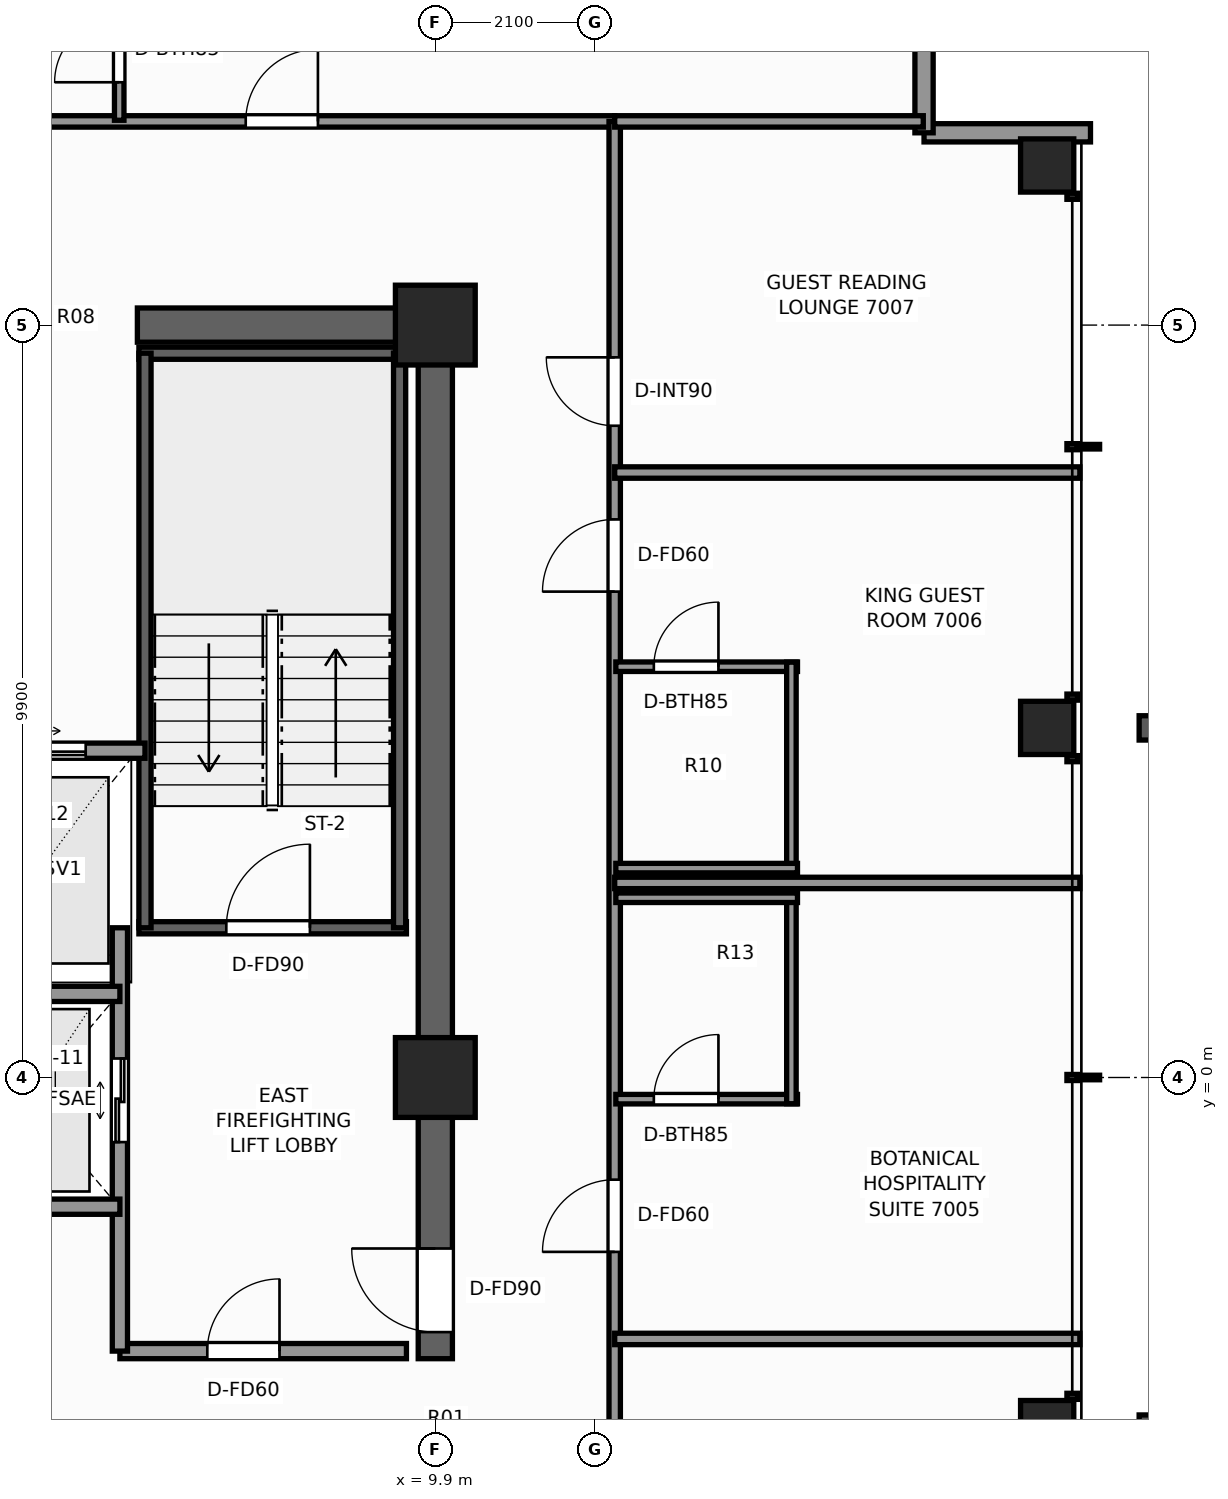
"""IFC4 building model, lengths in metres.
Left out: names, types, materials, properties, quantities, classifications, styles, units other than length and angle.
Written with IfcOpenShell. Run it as: python <this file> out.ifc"""

import sys

from ifc_helpers import new_model, si_unit, direction, frame, frame_2d, origin, origin_2d, place, context, subcontext, project, spatial, rectangle, extrude, element, fill, save


model = new_model("IFC4")
c1 = context("Model", 3, precision=1e-05, world=origin(), true_north=direction((0.0, 1.0)))
c2 = subcontext(c1, "Body", "Model", "MODEL_VIEW")
j1 = project(units=[si_unit("LENGTHUNIT", "METRE"), si_unit("PLANEANGLEUNIT", "RADIAN")], contexts=[c1])
p1 = place(None, origin())
s1 = spatial("IfcSite", under=j1, at=p1, CompositionType="ELEMENT")
p2 = place(p1, origin())
s2 = spatial("IfcBuilding", under=s1, at=p2, CompositionType="ELEMENT")
p3 = place(p2, frame((0.0, 0.0, 240.9)))
s3 = spatial("IfcBuildingStorey", under=s2, at=p3, CompositionType="ELEMENT", Elevation=240.9)
p4 = place(p3, frame((5.98, 9.9, 0.0), z_axis=(0.0, 0.0, 1.0), x_axis=(1.0, 0.0, 0.0)))
e1 = element("IfcWall", 1, at=p4, inside=s3, PredefinedType="SHEAR", context=c2, shape_type="SweptSolid", body=[
    extrude(rectangle(XDim=4.145, YDim=0.45, at=frame_2d((2.073, 0.0))), origin(), (0.0, 0.0, 1.0), 3.5),
])
p5 = place(p3, frame((9.9, -3.7, 0.0), z_axis=(0.0, 0.0, 1.0), x_axis=(0.0, 1.0, 0.0)))
e2 = element("IfcWall", 2, at=p5, inside=s3, PredefinedType="SHEAR", context=c2, shape_type="SweptSolid", body=[
    extrude(rectangle(XDim=13.375, YDim=0.45, at=frame_2d((6.688, 0.0))), origin(), (0.0, 0.0, 1.0), 3.5),
])
p6 = place(p5, frame((0.35, 0.0, 0.0)))
e3 = element("IfcOpeningElement", 3, at=p6, cuts=e2, PredefinedType="OPENING", context=c2, shape_type="SweptSolid", body=[
    extrude(rectangle(XDim=1.1, YDim=2.2, at=frame_2d((0.55, 1.1))), frame((0.0, 0.235, 0.0), z_axis=(0.0, -1.0, 0.0), x_axis=(1.0, 0.0, 0.0)), (0.0, 0.0, 1.0), 0.47),
])
for number, where, z_axis, x_axis in (
    (4, (9.9, 9.9, 0.0), (0.0, 0.0, 1.0), (1.0, 0.0, 0.0)),
    (5, (9.9, 0.0, 0.0), (0.0, 0.0, 1.0), (1.0, 0.0, 0.0)),
):
    element("IfcColumn", number, at=place(p3, frame(where, z_axis=z_axis, x_axis=x_axis)), inside=s3, PredefinedType="COLUMN", context=c2, shape_type="SweptSolid", body=[
        extrude(rectangle(XDim=1.05, YDim=1.05, at=origin_2d()), origin(), (0.0, 0.0, 1.0), 3.5),
    ])
for number, where, z_axis, x_axis in (
    (6, (17.95, -4.6, 0.0), (0.0, 0.0, 1.0), (1.0, 0.0, 0.0)),
    (7, (17.95, 4.6, 0.0), (0.0, 0.0, 1.0), (1.0, 0.0, 0.0)),
    (8, (17.95, 12.0, 0.0), (0.0, 0.0, 1.0), (1.0, 0.0, 0.0)),
):
    element("IfcColumn", number, at=place(p3, frame(where, z_axis=z_axis, x_axis=x_axis)), inside=s3, PredefinedType="COLUMN", context=c2, shape_type="SweptSolid", body=[
        extrude(rectangle(XDim=0.7, YDim=0.7, at=origin_2d()), origin(), (0.0, 0.0, 1.0), 3.5),
    ])
p7 = place(p3, frame((16.33, 12.43, 0.0), z_axis=(0.0, 0.0, 1.0), x_axis=(1.0, 0.0, 0.0)))
e9 = element("IfcWall", 9, at=p7, inside=s3, PredefinedType="STANDARD", context=c2, shape_type="SweptSolid", body=[
    extrude(rectangle(XDim=2.19, YDim=0.24, at=frame_2d((1.095, 0.0))), origin(), (0.0, 0.0, 1.0), 2.633),
])
p8 = place(p3, frame((16.33, 14.62, 0.0), z_axis=(0.0, 0.0, 1.0), x_axis=(0.0, -1.0, 0.0)))
e10 = element("IfcWall", 10, at=p8, inside=s3, PredefinedType="STANDARD", context=c2, shape_type="SweptSolid", body=[
    extrude(rectangle(XDim=2.19, YDim=0.24, at=frame_2d((1.095, 0.0))), origin(), (0.0, 0.0, 1.0), 2.633),
])
p9 = place(p3, frame((6.0, 1.97, 0.0), z_axis=(0.0, 0.0, 1.0), x_axis=(1.0, 0.0, 0.0)))
e11 = element("IfcWall", 11, at=p9, inside=s3, PredefinedType="SHEAR", context=c2, shape_type="SweptSolid", body=[
    extrude(rectangle(XDim=3.52, YDim=0.16, at=frame_2d((1.76, 0.0))), origin(), (0.0, 0.0, 1.0), 3.5),
])
p10 = place(p9, frame((1.15, 0.0, 0.0)))
e12 = element("IfcOpeningElement", 12, at=p10, cuts=e11, PredefinedType="OPENING", context=c2, shape_type="SweptSolid", body=[
    extrude(rectangle(XDim=1.1, YDim=2.2, at=frame_2d((0.55, 1.1))), frame((0.0, 0.09, 0.0), z_axis=(0.0, -1.0, 0.0), x_axis=(1.0, 0.0, 0.0)), (0.0, 0.0, 1.0), 0.18),
])
p11 = place(p3, frame((6.0, 9.53, 0.0), z_axis=(0.0, 0.0, 1.0), x_axis=(1.0, 0.0, 0.0)))
e13 = element("IfcWall", 13, at=p11, inside=s3, PredefinedType="SHEAR", context=c2, shape_type="SweptSolid", body=[
    extrude(rectangle(XDim=3.52, YDim=0.16, at=frame_2d((1.76, 0.0))), origin(), (0.0, 0.0, 1.0), 3.5),
])
for number, where, z_axis, x_axis in (
    (14, (6.08, 1.97, 0.0), (0.0, 0.0, 1.0), (0.0, 1.0, 0.0)),
    (15, (9.43, 1.97, 0.0), (0.0, 0.0, 1.0), (0.0, 1.0, 0.0)),
):
    element("IfcWall", number, at=place(p3, frame(where, z_axis=z_axis, x_axis=x_axis)), inside=s3, PredefinedType="SHEAR", context=c2, shape_type="SweptSolid", body=[
        extrude(rectangle(XDim=7.56, YDim=0.16, at=frame_2d((3.78, 0.0))), origin(), (0.0, 0.0, 1.0), 3.5),
    ])
p12 = place(p3, frame((5.75, -3.6, 0.0), z_axis=(0.0, 0.0, 1.0), x_axis=(1.0, 0.0, 0.0)))
e16 = element("IfcWall", 16, at=p12, inside=s3, PredefinedType="SOLIDWALL", context=c2, shape_type="SweptSolid", body=[
    extrude(rectangle(XDim=3.77, YDim=0.2, at=frame_2d((1.885, 0.0))), origin(), (0.0, 0.0, 1.0), 3.25),
])
p13 = place(p12, frame((1.15, 0.0, 0.0)))
e17 = element("IfcOpeningElement", 17, at=p13, cuts=e16, PredefinedType="OPENING", context=c2, shape_type="SweptSolid", body=[
    extrude(rectangle(XDim=0.95, YDim=2.06, at=frame_2d((0.475, 1.03))), frame((0.0, 0.11, 0.0), z_axis=(0.0, -1.0, 0.0), x_axis=(1.0, 0.0, 0.0)), (0.0, 0.0, 1.0), 0.22),
])
p14 = place(p3, frame((5.75, -3.6, 0.0), z_axis=(0.0, 0.0, 1.0), x_axis=(0.0, 1.0, 0.0)))
e18 = element("IfcWall", 18, at=p14, inside=s3, PredefinedType="SOLIDWALL", context=c2, shape_type="SweptSolid", body=[
    extrude(rectangle(XDim=5.57, YDim=0.2, at=frame_2d((2.785, 0.0))), origin(), (0.0, 0.0, 1.0), 3.25),
])
p15 = place(p14, frame((2.75, 0.0, 0.0)))
e19 = element("IfcOpeningElement", 19, at=p15, cuts=e18, PredefinedType="OPENING", context=c2, shape_type="SweptSolid", body=[
    extrude(rectangle(XDim=1.1, YDim=2.2, at=frame_2d((0.55, 1.1))), frame((0.0, 0.11, 0.0), z_axis=(0.0, -1.0, 0.0), x_axis=(1.0, 0.0, 0.0)), (0.0, 0.0, 1.0), 0.22),
])
for number, where, z_axis, x_axis in (
    (20, (3.35, -1.7, 0.0), (0.0, 0.0, 1.0), (1.0, 0.0, 0.0)),
    (21, (3.35, 1.1, 0.0), (0.0, 0.0, 1.0), (1.0, 0.0, 0.0)),
):
    element("IfcWall", number, at=place(p3, frame(where, z_axis=z_axis, x_axis=x_axis)), inside=s3, PredefinedType="SOLIDWALL", context=c2, shape_type="SweptSolid", body=[
        extrude(rectangle(XDim=2.4, YDim=0.2, at=frame_2d((1.2, 0.0))), origin(), (0.0, 0.0, 1.0), 3.25),
    ])
p16 = place(p3, frame((3.35, 4.3, 0.0), z_axis=(0.0, 0.0, 1.0), x_axis=(1.0, 0.0, 0.0)))
e22 = element("IfcWall", 22, at=p16, inside=s3, PredefinedType="SOLIDWALL", context=c2, shape_type="SweptSolid", body=[
    extrude(rectangle(XDim=2.73, YDim=0.2, at=frame_2d((1.365, 0.0))), origin(), (0.0, 0.0, 1.0), 3.25),
])
p17 = place(p16, frame((0.75, 0.0, 0.0)))
e23 = element("IfcOpeningElement", 23, at=p17, cuts=e22, PredefinedType="OPENING", context=c2, shape_type="SweptSolid", body=[
    extrude(rectangle(XDim=1.2, YDim=2.25, at=frame_2d((0.6, 1.125))), frame((0.0, 0.11, 0.0), z_axis=(0.0, -1.0, 0.0), x_axis=(1.0, 0.0, 0.0)), (0.0, 0.0, 1.0), 0.22),
])
p18 = place(p3, frame((-12.58, 12.58, 0.0), z_axis=(0.0, 0.0, 1.0), x_axis=(1.0, 0.0, 0.0)))
e24 = element("IfcWall", 24, at=p18, inside=s3, PredefinedType="PARTITIONING", context=c2, shape_type="SweptSolid", body=[
    extrude(rectangle(XDim=24.84, YDim=0.15, at=frame_2d((12.42, 0.0))), origin(), (0.0, 0.0, 1.0), 2.539),
])
p19 = place(p18, frame((3.321, 0.0, 0.0)))
e25 = element("IfcOpeningElement", 25, at=p19, cuts=e24, PredefinedType="OPENING", context=c2, shape_type="SweptSolid", body=[
    extrude(rectangle(XDim=0.95, YDim=2.06, at=frame_2d((0.475, 1.03))), frame((0.0, 0.085, 0.0), z_axis=(0.0, -1.0, 0.0), x_axis=(1.0, 0.0, 0.0)), (0.0, 0.0, 1.0), 0.17),
])
p20 = place(p18, frame((9.988, 0.0, 0.0)))
e26 = element("IfcOpeningElement", 26, at=p20, cuts=e24, PredefinedType="OPENING", context=c2, shape_type="SweptSolid", body=[
    extrude(rectangle(XDim=0.95, YDim=2.06, at=frame_2d((0.475, 1.03))), frame((0.0, 0.085, 0.0), z_axis=(0.0, -1.0, 0.0), x_axis=(1.0, 0.0, 0.0)), (0.0, 0.0, 1.0), 0.17),
])
p21 = place(p18, frame((19.986, 0.0, 0.0)))
e27 = element("IfcOpeningElement", 27, at=p21, cuts=e24, PredefinedType="OPENING", context=c2, shape_type="SweptSolid", body=[
    extrude(rectangle(XDim=0.95, YDim=2.06, at=frame_2d((0.475, 1.03))), frame((0.0, 0.085, 0.0), z_axis=(0.0, -1.0, 0.0), x_axis=(1.0, 0.0, 0.0)), (0.0, 0.0, 1.0), 0.17),
])
p22 = place(p3, frame((12.26, -12.26, 0.0), z_axis=(0.0, 0.0, 1.0), x_axis=(0.0, 1.0, 0.0)))
e28 = element("IfcWall", 28, at=p22, inside=s3, PredefinedType="PARTITIONING", context=c2, shape_type="SweptSolid", body=[
    extrude(rectangle(XDim=24.84, YDim=0.15, at=frame_2d((12.42, 0.0))), origin(), (0.0, 0.0, 1.0), 2.539),
])
p23 = place(p22, frame((4.275, 0.0, 0.0)))
e29 = element("IfcOpeningElement", 29, at=p23, cuts=e28, PredefinedType="OPENING", context=c2, shape_type="SweptSolid", body=[
    extrude(rectangle(XDim=0.9, YDim=2.06, at=frame_2d((0.45, 1.03))), frame((0.0, 0.085, 0.0), z_axis=(0.0, -1.0, 0.0), x_axis=(1.0, 0.0, 0.0)), (0.0, 0.0, 1.0), 0.17),
])
p24 = place(p22, frame((9.966, 0.0, 0.0)))
e30 = element("IfcOpeningElement", 30, at=p24, cuts=e28, PredefinedType="OPENING", context=c2, shape_type="SweptSolid", body=[
    extrude(rectangle(XDim=0.95, YDim=2.06, at=frame_2d((0.475, 1.03))), frame((0.0, 0.085, 0.0), z_axis=(0.0, -1.0, 0.0), x_axis=(1.0, 0.0, 0.0)), (0.0, 0.0, 1.0), 0.17),
])
p25 = place(p22, frame((18.653, 0.0, 0.0)))
e31 = element("IfcOpeningElement", 31, at=p25, cuts=e28, PredefinedType="OPENING", context=c2, shape_type="SweptSolid", body=[
    extrude(rectangle(XDim=0.95, YDim=2.06, at=frame_2d((0.475, 1.03))), frame((0.0, 0.085, 0.0), z_axis=(0.0, -1.0, 0.0), x_axis=(1.0, 0.0, 0.0)), (0.0, 0.0, 1.0), 0.17),
])
p26 = place(p22, frame((20.836, 0.0, 0.0)))
e32 = element("IfcOpeningElement", 32, at=p26, cuts=e28, PredefinedType="OPENING", context=c2, shape_type="SweptSolid", body=[
    extrude(rectangle(XDim=0.9, YDim=2.06, at=frame_2d((0.45, 1.03))), frame((0.0, 0.085, 0.0), z_axis=(0.0, -1.0, 0.0), x_axis=(1.0, 0.0, 0.0)), (0.0, 0.0, 1.0), 0.17),
])
p27 = place(p3, frame((12.26, 12.58, 0.0), z_axis=(0.0, 0.0, 1.0), x_axis=(1.0, 0.0, 0.0)))
e33 = element("IfcWall", 33, at=p27, inside=s3, PredefinedType="PARTITIONING", context=c2, shape_type="SweptSolid", body=[
    extrude(rectangle(XDim=4.06, YDim=0.15, at=frame_2d((2.03, 0.0))), origin(), (0.0, 0.0, 1.0), 3.25),
])
for number, where, z_axis, x_axis in (
    (34, (12.26, -3.44, 0.0), (0.0, 0.0, 1.0), (1.0, 0.0, 0.0)),
    (35, (12.26, 2.56, 0.0), (0.0, 0.0, 1.0), (1.0, 0.0, 0.0)),
):
    element("IfcWall", number, at=place(p3, frame(where, z_axis=z_axis, x_axis=x_axis)), inside=s3, PredefinedType="PARTITIONING", context=c2, shape_type="SweptSolid", body=[
        extrude(rectangle(XDim=6.12, YDim=0.15, at=frame_2d((3.06, 0.0))), origin(), (0.0, 0.0, 1.0), 2.623),
    ])
p28 = place(p3, frame((12.275, -0.285, 0.0), z_axis=(0.0, 0.0, 1.0), x_axis=(1.0, 0.0, 0.0)))
e36 = element("IfcWall", 36, at=p28, inside=s3, PredefinedType="PARTITIONING", context=c2, shape_type="SweptSolid", body=[
    extrude(rectangle(XDim=2.39, YDim=0.125, at=frame_2d((1.195, 0.0))), origin(), (0.0, 0.0, 1.0), 3.25),
])
p29 = place(p28, frame((0.5, 0.0, 0.0)))
e37 = element("IfcOpeningElement", 37, at=p29, cuts=e36, PredefinedType="OPENING", context=c2, shape_type="SweptSolid", body=[
    extrude(rectangle(XDim=0.85, YDim=2.03, at=frame_2d((0.425, 1.015))), frame((0.0, 0.073, 0.0), z_axis=(0.0, -1.0, 0.0), x_axis=(1.0, 0.0, 0.0)), (0.0, 0.0, 1.0), 0.145),
])
p30 = place(p3, frame((14.585, -0.345, 0.0), z_axis=(0.0, 0.0, 1.0), x_axis=(0.0, 1.0, 0.0)))
e38 = element("IfcWall", 38, at=p30, inside=s3, PredefinedType="PARTITIONING", context=c2, shape_type="SweptSolid", body=[
    extrude(rectangle(XDim=2.77, YDim=0.125, at=frame_2d((1.385, 0.0))), origin(), (0.0, 0.0, 1.0), 2.775),
])
p31 = place(p3, frame((12.275, 2.365, 0.0), z_axis=(0.0, 0.0, 1.0), x_axis=(1.0, 0.0, 0.0)))
e39 = element("IfcWall", 39, at=p31, inside=s3, PredefinedType="PARTITIONING", context=c2, shape_type="SweptSolid", body=[
    extrude(rectangle(XDim=2.39, YDim=0.125, at=frame_2d((1.195, 0.0))), origin(), (0.0, 0.0, 1.0), 3.25),
])
p32 = place(p3, frame((12.26, 7.96, 0.0), z_axis=(0.0, 0.0, 1.0), x_axis=(1.0, 0.0, 0.0)))
e40 = element("IfcWall", 40, at=p32, inside=s3, PredefinedType="PARTITIONING", context=c2, shape_type="SweptSolid", body=[
    extrude(rectangle(XDim=6.12, YDim=0.15, at=frame_2d((3.06, 0.0))), origin(), (0.0, 0.0, 1.0), 2.623),
])
p33 = place(p3, frame((12.275, 5.405, 0.0), z_axis=(0.0, 0.0, 1.0), x_axis=(1.0, 0.0, 0.0)))
e41 = element("IfcWall", 41, at=p33, inside=s3, PredefinedType="PARTITIONING", context=c2, shape_type="SweptSolid", body=[
    extrude(rectangle(XDim=2.39, YDim=0.125, at=frame_2d((1.195, 0.0))), origin(), (0.0, 0.0, 1.0), 3.25),
])
p34 = place(p33, frame((0.5, 0.0, 0.0)))
e42 = element("IfcOpeningElement", 42, at=p34, cuts=e41, PredefinedType="OPENING", context=c2, shape_type="SweptSolid", body=[
    extrude(rectangle(XDim=0.85, YDim=2.03, at=frame_2d((0.425, 1.015))), frame((0.0, 0.073, 0.0), z_axis=(0.0, -1.0, 0.0), x_axis=(1.0, 0.0, 0.0)), (0.0, 0.0, 1.0), 0.145),
])
p35 = place(p3, frame((14.585, 2.695, 0.0), z_axis=(0.0, 0.0, 1.0), x_axis=(0.0, 1.0, 0.0)))
e43 = element("IfcWall", 43, at=p35, inside=s3, PredefinedType="PARTITIONING", context=c2, shape_type="SweptSolid", body=[
    extrude(rectangle(XDim=2.77, YDim=0.125, at=frame_2d((1.385, 0.0))), origin(), (0.0, 0.0, 1.0), 2.539),
])
p36 = place(p3, frame((12.275, 2.755, 0.0), z_axis=(0.0, 0.0, 1.0), x_axis=(1.0, 0.0, 0.0)))
e44 = element("IfcWall", 44, at=p36, inside=s3, PredefinedType="PARTITIONING", context=c2, shape_type="SweptSolid", body=[
    extrude(rectangle(XDim=2.39, YDim=0.125, at=frame_2d((1.195, 0.0))), origin(), (0.0, 0.0, 1.0), 3.25),
])
p37 = place(p3, frame((5.741, 12.595, 0.0), z_axis=(0.0, 0.0, 1.0), x_axis=(0.0, 1.0, 0.0)))
e45 = element("IfcWall", 45, at=p37, inside=s3, PredefinedType="PARTITIONING", context=c2, shape_type="SweptSolid", body=[
    extrude(rectangle(XDim=2.39, YDim=0.125, at=frame_2d((1.195, 0.0))), origin(), (0.0, 0.0, 1.0), 3.25),
])
p38 = place(p37, frame((0.5, 0.0, 0.0)))
e46 = element("IfcOpeningElement", 46, at=p38, cuts=e45, PredefinedType="OPENING", context=c2, shape_type="SweptSolid", body=[
    extrude(rectangle(XDim=0.85, YDim=2.03, at=frame_2d((0.425, 1.015))), frame((0.0, 0.073, 0.0), z_axis=(0.0, -1.0, 0.0), x_axis=(1.0, 0.0, 0.0)), (0.0, 0.0, 1.0), 0.145),
])
p39 = place(p10, origin())
e47 = element("IfcDoor", 47, at=p39, inside=s3, OperationType="SINGLE_SWING_RIGHT", PredefinedType="DOOR", context=c2, shape_type="SweptSolid", body=[
    extrude(rectangle(XDim=1.1, YDim=2.2, at=frame_2d((0.55, 1.1))), frame((0.0, 0.025, 0.0), z_axis=(0.0, -1.0, 0.0), x_axis=(1.0, 0.0, 0.0)), (0.0, 0.0, 1.0), 0.05),
])
fill(e12, e47)
p40 = place(p6, origin())
e48 = element("IfcDoor", 48, at=p40, inside=s3, OperationType="SINGLE_SWING_RIGHT", PredefinedType="DOOR", context=c2, shape_type="SweptSolid", body=[
    extrude(rectangle(XDim=1.1, YDim=2.2, at=frame_2d((0.55, 1.1))), frame((0.0, 0.025, 0.0), z_axis=(0.0, -1.0, 0.0), x_axis=(1.0, 0.0, 0.0)), (0.0, 0.0, 1.0), 0.05),
])
fill(e3, e48)
p41 = place(p15, origin())
e49 = element("IfcDoor", 49, at=p41, inside=s3, OperationType="DOUBLE_DOOR_SLIDING", PredefinedType="DOOR", context=c2, shape_type="SweptSolid", body=[
    extrude(rectangle(XDim=1.1, YDim=2.2, at=frame_2d((0.55, 1.1))), frame((0.0, 0.025, 0.0), z_axis=(0.0, -1.0, 0.0), x_axis=(1.0, 0.0, 0.0)), (0.0, 0.0, 1.0), 0.05),
])
fill(e19, e49)
p42 = place(p17, origin())
e50 = element("IfcDoor", 50, at=p42, inside=s3, OperationType="DOUBLE_DOOR_SLIDING", PredefinedType="DOOR", context=c2, shape_type="SweptSolid", body=[
    extrude(rectangle(XDim=1.2, YDim=2.25, at=frame_2d((0.6, 1.125))), frame((0.0, 0.025, 0.0), z_axis=(0.0, -1.0, 0.0), x_axis=(1.0, 0.0, 0.0)), (0.0, 0.0, 1.0), 0.05),
])
fill(e23, e50)
p43 = place(p13, origin())
e51 = element("IfcDoor", 51, at=p43, inside=s3, OperationType="SINGLE_SWING_RIGHT", PredefinedType="DOOR", context=c2, shape_type="SweptSolid", body=[
    extrude(rectangle(XDim=0.95, YDim=2.06, at=frame_2d((0.475, 1.03))), frame((0.0, 0.025, 0.0), z_axis=(0.0, -1.0, 0.0), x_axis=(1.0, 0.0, 0.0)), (0.0, 0.0, 1.0), 0.05),
])
fill(e17, e51)
p44 = place(p29, origin())
e52 = element("IfcDoor", 52, at=p44, inside=s3, OperationType="SINGLE_SWING_RIGHT", PredefinedType="DOOR", context=c2, shape_type="SweptSolid", body=[
    extrude(rectangle(XDim=0.85, YDim=2.03, at=frame_2d((0.425, 1.015))), frame((0.0, 0.025, 0.0), z_axis=(0.0, -1.0, 0.0), x_axis=(1.0, 0.0, 0.0)), (0.0, 0.0, 1.0), 0.05),
])
fill(e37, e52)
p45 = place(p24, origin())
e53 = element("IfcDoor", 53, at=p45, inside=s3, OperationType="SINGLE_SWING_LEFT", PredefinedType="DOOR", context=c2, shape_type="SweptSolid", body=[
    extrude(rectangle(XDim=0.95, YDim=2.06, at=frame_2d((0.475, 1.03))), frame((0.0, 0.025, 0.0), z_axis=(0.0, -1.0, 0.0), x_axis=(1.0, 0.0, 0.0)), (0.0, 0.0, 1.0), 0.05),
])
fill(e30, e53)
p46 = place(p34, origin())
e54 = element("IfcDoor", 54, at=p46, inside=s3, OperationType="SINGLE_SWING_RIGHT", PredefinedType="DOOR", context=c2, shape_type="SweptSolid", body=[
    extrude(rectangle(XDim=0.85, YDim=2.03, at=frame_2d((0.425, 1.015))), frame((0.0, 0.025, 0.0), z_axis=(0.0, -1.0, 0.0), x_axis=(1.0, 0.0, 0.0)), (0.0, 0.0, 1.0), 0.05),
])
fill(e42, e54)
p47 = place(p25, origin())
e55 = element("IfcDoor", 55, at=p47, inside=s3, OperationType="SINGLE_SWING_LEFT", PredefinedType="DOOR", context=c2, shape_type="SweptSolid", body=[
    extrude(rectangle(XDim=0.95, YDim=2.06, at=frame_2d((0.475, 1.03))), frame((0.0, 0.025, 0.0), z_axis=(0.0, -1.0, 0.0), x_axis=(1.0, 0.0, 0.0)), (0.0, 0.0, 1.0), 0.05),
])
fill(e31, e55)
p48 = place(p26, origin())
e56 = element("IfcDoor", 56, at=p48, inside=s3, OperationType="SINGLE_SWING_RIGHT", PredefinedType="DOOR", context=c2, shape_type="SweptSolid", body=[
    extrude(rectangle(XDim=0.9, YDim=2.06, at=frame_2d((0.45, 1.03))), frame((0.0, 0.025, 0.0), z_axis=(0.0, -1.0, 0.0), x_axis=(1.0, 0.0, 0.0)), (0.0, 0.0, 1.0), 0.05),
])
fill(e32, e56)
p49 = place(p38, origin())
e57 = element("IfcDoor", 57, at=p49, inside=s3, OperationType="SINGLE_SWING_LEFT", PredefinedType="DOOR", context=c2, shape_type="SweptSolid", body=[
    extrude(rectangle(XDim=0.85, YDim=2.03, at=frame_2d((0.425, 1.015))), frame((0.0, 0.025, 0.0), z_axis=(0.0, -1.0, 0.0), x_axis=(1.0, 0.0, 0.0)), (0.0, 0.0, 1.0), 0.05),
])
fill(e46, e57)
p50 = place(p21, origin())
e58 = element("IfcDoor", 58, at=p50, inside=s3, OperationType="SINGLE_SWING_RIGHT", PredefinedType="DOOR", context=c2, shape_type="SweptSolid", body=[
    extrude(rectangle(XDim=0.95, YDim=2.06, at=frame_2d((0.475, 1.03))), frame((0.0, 0.025, 0.0), z_axis=(0.0, -1.0, 0.0), x_axis=(1.0, 0.0, 0.0)), (0.0, 0.0, 1.0), 0.05),
])
fill(e27, e58)
save(model, sys.argv[1])
